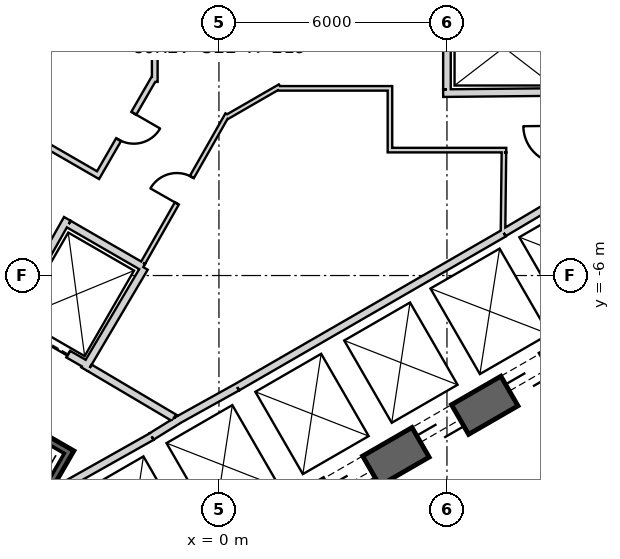
"""IFC4 building model, lengths in metres.
Left out: names, types, materials, properties, quantities, classifications, styles, units other than length and angle.
Written with IfcOpenShell. Run it as: python <this file> out.ifc"""

import sys

from ifc_helpers import new_model, si_unit, direction, frame, frame_2d, origin, place, context, subcontext, project, spatial, rectangle, extrude, element, fill, save


model = new_model("IFC4")
c1 = context("Model", 3, precision=1e-05, world=origin(), true_north=direction((0.0, 1.0)))
c2 = subcontext(c1, "Body", "Model", "MODEL_VIEW")
j1 = project(units=[si_unit("LENGTHUNIT", "METRE"), si_unit("PLANEANGLEUNIT", "RADIAN")], contexts=[c1])
p1 = place(None, origin())
s1 = spatial("IfcSite", under=j1, at=p1, CompositionType="ELEMENT")
p2 = place(p1, origin())
s2 = spatial("IfcBuilding", under=s1, at=p2, CompositionType="ELEMENT")
p3 = place(p2, frame((0.0, 0.0, 156.2)))
s3 = spatial("IfcBuildingStorey", under=s2, at=p3, CompositionType="ELEMENT", Elevation=156.2)
p4 = place(p3, frame((-7.825, -17.97, 0.0), z_axis=(0.0, 0.0, 1.0), x_axis=(0.866028369851, 0.499994862586, 0.0)))
e1 = element("IfcWall", 1, at=p4, inside=s3, PredefinedType="SHEAR", context=c2, shape_type="SweptSolid", body=[
    extrude(rectangle(XDim=31.523, YDim=0.9, at=frame_2d((15.762, 0.0))), origin(), (0.0, 0.0, 1.0), 7.0),
])
p5 = place(p4, frame((7.062, 0.0, 0.0)))
e2 = element("IfcOpeningElement", 2, at=p5, cuts=e1, PredefinedType="OPENING", context=c2, shape_type="SweptSolid", body=[
    extrude(rectangle(XDim=1.2, YDim=2.4, at=frame_2d((0.6, 1.2))), frame((0.0, 0.46, 0.0), z_axis=(0.0, -1.0, 0.0), x_axis=(1.0, 0.0, 0.0)), (0.0, 0.0, 1.0), 0.92),
])
p6 = place(p4, frame((9.762, 0.0, 0.0)))
e3 = element("IfcOpeningElement", 3, at=p6, cuts=e1, PredefinedType="OPENING", context=c2, shape_type="SweptSolid", body=[
    extrude(rectangle(XDim=1.2, YDim=2.4, at=frame_2d((0.6, 1.2))), frame((0.0, 0.46, 0.0), z_axis=(0.0, -1.0, 0.0), x_axis=(1.0, 0.0, 0.0)), (0.0, 0.0, 1.0), 0.92),
])
p7 = place(p4, frame((12.462, 0.0, 0.0)))
e4 = element("IfcOpeningElement", 4, at=p7, cuts=e1, PredefinedType="OPENING", context=c2, shape_type="SweptSolid", body=[
    extrude(rectangle(XDim=1.2, YDim=2.4, at=frame_2d((0.6, 1.2))), frame((0.0, 0.46, 0.0), z_axis=(0.0, -1.0, 0.0), x_axis=(1.0, 0.0, 0.0)), (0.0, 0.0, 1.0), 0.92),
])
p8 = place(p4, frame((15.162, 0.0, 0.0)))
e5 = element("IfcOpeningElement", 5, at=p8, cuts=e1, PredefinedType="OPENING", context=c2, shape_type="SweptSolid", body=[
    extrude(rectangle(XDim=1.2, YDim=2.4, at=frame_2d((0.6, 1.2))), frame((0.0, 0.46, 0.0), z_axis=(0.0, -1.0, 0.0), x_axis=(1.0, 0.0, 0.0)), (0.0, 0.0, 1.0), 0.92),
])
p9 = place(p4, frame((17.862, 0.0, 0.0)))
e6 = element("IfcOpeningElement", 6, at=p9, cuts=e1, PredefinedType="OPENING", context=c2, shape_type="SweptSolid", body=[
    extrude(rectangle(XDim=1.2, YDim=2.4, at=frame_2d((0.6, 1.2))), frame((0.0, 0.46, 0.0), z_axis=(0.0, -1.0, 0.0), x_axis=(1.0, 0.0, 0.0)), (0.0, 0.0, 1.0), 0.92),
])
p10 = place(p4, frame((20.562, 0.0, 0.0)))
e7 = element("IfcOpeningElement", 7, at=p10, cuts=e1, PredefinedType="OPENING", context=c2, shape_type="SweptSolid", body=[
    extrude(rectangle(XDim=1.2, YDim=2.4, at=frame_2d((0.6, 1.2))), frame((0.0, 0.46, 0.0), z_axis=(0.0, -1.0, 0.0), x_axis=(1.0, 0.0, 0.0)), (0.0, 0.0, 1.0), 0.92),
])
p11 = place(p4, frame((26.712, 0.0, 0.0)))
e8 = element("IfcOpeningElement", 8, at=p11, cuts=e1, PredefinedType="OPENING", context=c2, shape_type="SweptSolid", body=[
    extrude(rectangle(XDim=1.2, YDim=2.4, at=frame_2d((0.6, 1.2))), frame((0.0, 0.46, 0.0), z_axis=(0.0, -1.0, 0.0), x_axis=(1.0, 0.0, 0.0)), (0.0, 0.0, 1.0), 0.92),
])
p12 = place(p4, frame((3.612, 0.0, 0.0)))
e9 = element("IfcOpeningElement", 9, at=p12, cuts=e1, PredefinedType="OPENING", context=c2, shape_type="SweptSolid", body=[
    extrude(rectangle(XDim=1.2, YDim=2.4, at=frame_2d((0.6, 1.2))), frame((0.0, 0.46, 0.0), z_axis=(0.0, -1.0, 0.0), x_axis=(1.0, 0.0, 0.0)), (0.0, 0.0, 1.0), 0.92),
])
p13 = place(p3, frame((0.483, -8.936, 0.0), z_axis=(0.0, 0.0, 1.0), x_axis=(0.866030989016, 0.499990325971, 0.0)))
e10 = element("IfcWall", 10, at=p13, inside=s3, PredefinedType="PLUMBINGWALL", context=c2, shape_type="SweptSolid", body=[
    extrude(rectangle(XDim=8.1, YDim=0.2, at=frame_2d((4.05, 0.0))), origin(), (0.0, 0.0, 1.0), 6.65),
])
p14 = place(p3, frame((7.493, -4.878, 0.0), z_axis=(0.0, 0.0, 1.0), x_axis=(0.859981807212, 0.510324691999, 0.0)))
e11 = element("IfcWall", 11, at=p14, inside=s3, PredefinedType="PLUMBINGWALL", context=c2, shape_type="SweptSolid", body=[
    extrude(rectangle(XDim=1.845, YDim=0.2, at=frame_2d((0.922, 0.0))), origin(), (0.0, 0.0, 1.0), 6.65),
])
p15 = place(p3, frame((-1.769, -10.237, 0.0), z_axis=(0.0, 0.0, 1.0), x_axis=(-0.871534483978, -0.490334215854, 0.0)))
e12 = element("IfcWall", 12, at=p15, inside=s3, PredefinedType="PLUMBINGWALL", context=c2, shape_type="SweptSolid", body=[
    extrude(rectangle(XDim=2.7, YDim=0.2, at=frame_2d((1.35, 0.0))), origin(), (0.0, 0.0, 1.0), 6.65),
])
p16 = place(p3, frame((-1.024, -9.771, 0.0), z_axis=(0.0, 0.0, 1.0), x_axis=(-0.850348075135, -0.526220629693, 0.0)))
e13 = element("IfcWall", 13, at=p16, inside=s3, PredefinedType="PLUMBINGWALL", context=c2, shape_type="SweptSolid", body=[
    extrude(rectangle(XDim=0.878, YDim=0.2, at=frame_2d((0.439, 0.0))), origin(), (0.0, 0.0, 1.0), 6.65),
])
p17 = place(p3, frame((-1.13, -9.831, 0.0), z_axis=(0.0, 0.0, 1.0), x_axis=(0.874269620932, 0.485440655401, 0.0)))
e14 = element("IfcWall", 14, at=p17, inside=s3, PredefinedType="PLUMBINGWALL", context=c2, shape_type="SweptSolid", body=[
    extrude(rectangle(XDim=1.845, YDim=0.2, at=frame_2d((0.922, 0.0))), origin(), (0.0, 0.0, 1.0), 6.65),
])
p18 = place(p3, frame((5.9, -1.201, 0.0), z_axis=(0.0, 0.0, 1.0), x_axis=(0.999950064753, 0.009993397809, 0.0)))
e15 = element("IfcWall", 15, at=p18, inside=s3, PredefinedType="PLUMBINGWALL", context=c2, shape_type="SweptSolid", body=[
    extrude(rectangle(XDim=3.2, YDim=0.2, at=frame_2d((1.6, 0.0))), origin(), (0.0, 0.0, 1.0), 6.65),
])
p19 = place(p3, frame((6.0, -1.1, 0.0), z_axis=(0.0, 0.0, 1.0), x_axis=(0.0, 1.0, 0.0)))
e16 = element("IfcWall", 16, at=p19, inside=s3, PredefinedType="PLUMBINGWALL", context=c2, shape_type="SweptSolid", body=[
    extrude(rectangle(XDim=2.28, YDim=0.2, at=frame_2d((1.14, 0.0))), origin(), (0.0, 0.0, 1.0), 6.65),
])
p20 = place(p3, frame((-3.905, -10.563, -0.35), z_axis=(0.0, 0.0, 1.0), x_axis=(-0.500012932018, -0.866017937352, 0.0)))
e17 = element("IfcWall", 17, at=p20, inside=s3, PredefinedType="SHEAR", context=c2, shape_type="SweptSolid", body=[
    extrude(rectangle(XDim=8.1, YDim=0.2, at=frame_2d((4.05, 0.0))), origin(), (0.0, 0.0, 1.0), 7.0),
])
p21 = place(p3, frame((-4.041, -10.599, -0.35), z_axis=(0.0, 0.0, 1.0), x_axis=(-0.866047807691, 0.499961193289, 0.0)))
e18 = element("IfcWall", 18, at=p21, inside=s3, PredefinedType="SHEAR", context=c2, shape_type="SweptSolid", body=[
    extrude(rectangle(XDim=3.6, YDim=0.2, at=frame_2d((1.8, 0.0))), origin(), (0.0, 0.0, 1.0), 7.0),
])
p22 = place(p21, frame((1.25, 0.0, 0.35)))
e19 = element("IfcOpeningElement", 19, at=p22, cuts=e18, PredefinedType="OPENING", context=c2, shape_type="SweptSolid", body=[
    extrude(rectangle(XDim=1.1, YDim=2.1, at=frame_2d((0.55, 1.05))), frame((0.0, 0.11, 0.0), z_axis=(0.0, -1.0, 0.0), x_axis=(1.0, 0.0, 0.0)), (0.0, 0.0, 1.0), 0.22),
])
p23 = place(p3, frame((-3.446, -8.368, 0.0), z_axis=(0.0, 0.0, 1.0), x_axis=(-0.866024647952, 0.500001309137, 0.0)))
e20 = element("IfcWall", 20, at=p23, inside=s3, PredefinedType="PLUMBINGWALL", context=c2, shape_type="SweptSolid", body=[
    extrude(rectangle(XDim=2.4, YDim=0.2, at=frame_2d((1.2, 0.0))), origin(), (0.0, 0.0, 1.0), 6.65),
])
p24 = place(p23, frame((0.6, 0.0, 0.0)))
e21 = element("IfcOpeningElement", 21, at=p24, cuts=e20, PredefinedType="OPENING", context=c2, shape_type="SweptSolid", body=[
    extrude(rectangle(XDim=1.2, YDim=2.4, at=frame_2d((0.6, 1.2))), frame((0.0, 0.11, 0.0), z_axis=(0.0, -1.0, 0.0), x_axis=(1.0, 0.0, 0.0)), (0.0, 0.0, 1.0), 0.22),
])
p25 = place(p3, frame((-1.961, -5.796, 0.0), z_axis=(0.0, 0.0, 1.0), x_axis=(-0.508647062354, -0.860975125052, 0.0)))
e22 = element("IfcWall", 22, at=p25, inside=s3, PredefinedType="PLUMBINGWALL", context=c2, shape_type="SweptSolid", body=[
    extrude(rectangle(XDim=3.1, YDim=0.2, at=frame_2d((1.55, 0.0))), origin(), (0.0, 0.0, 1.0), 6.65),
])
p26 = place(p3, frame((-3.99, -4.509, 0.0), z_axis=(0.0, 0.0, 1.0), x_axis=(-0.491358283181, -0.870957540612, 0.0)))
e23 = element("IfcWall", 23, at=p26, inside=s3, PredefinedType="PLUMBINGWALL", context=c2, shape_type="SweptSolid", body=[
    extrude(rectangle(XDim=3.2, YDim=0.2, at=frame_2d((1.6, 0.0))), origin(), (0.0, 0.0, 1.0), 6.65),
])
p27 = place(p3, frame((-3.953, -4.646, 0.0), z_axis=(0.0, 0.0, 1.0), x_axis=(0.866065302921, -0.4999308863, 0.0)))
e24 = element("IfcWall", 24, at=p27, inside=s3, PredefinedType="PLUMBINGWALL", context=c2, shape_type="SweptSolid", body=[
    extrude(rectangle(XDim=2.264, YDim=0.2, at=frame_2d((1.132, 0.0))), origin(), (0.0, 0.0, 1.0), 6.65),
])
p28 = place(p3, frame((-3.401, -8.43, 0.0), z_axis=(0.0, 0.0, 1.0), x_axis=(0.860615607571, -0.509255118781, 0.0)))
e25 = element("IfcWall", 25, at=p28, inside=s3, PredefinedType="PARTITIONING", context=c2, shape_type="SweptSolid", body=[
    extrude(rectangle(XDim=2.581, YDim=0.2, at=frame_2d((1.29, 0.0))), origin(), (0.0, 0.0, 1.0), 6.65),
])
p29 = place(p3, frame((0.224, -1.761, 0.0), z_axis=(0.0, 0.0, 1.0), x_axis=(-0.494327216836, -0.869275907118, 0.0)))
e26 = element("IfcWall", 26, at=p29, inside=s3, PredefinedType="PARTITIONING", context=c2, shape_type="SweptSolid", body=[
    extrude(rectangle(XDim=4.487, YDim=0.12, at=frame_2d((2.244, 0.0))), origin(), (0.0, 0.0, 1.0), 6.65),
])
p30 = place(p29, frame((1.895, 0.0, 0.0)))
e27 = element("IfcOpeningElement", 27, at=p30, cuts=e26, PredefinedType="OPENING", context=c2, shape_type="SweptSolid", body=[
    extrude(rectangle(XDim=0.8, YDim=2.1, at=frame_2d((0.4, 1.05))), frame((0.0, 0.07, 0.0), z_axis=(0.0, -1.0, 0.0), x_axis=(1.0, 0.0, 0.0)), (0.0, 0.0, 1.0), 0.14),
])
p31 = place(p3, frame((1.605, -1.023, 0.0), z_axis=(0.0, 0.0, 1.0), x_axis=(-0.866001581989, -0.50004125829, 0.0)))
e28 = element("IfcWall", 28, at=p31, inside=s3, PredefinedType="PARTITIONING", context=c2, shape_type="SweptSolid", body=[
    extrude(rectangle(XDim=1.635, YDim=0.12, at=frame_2d((0.817, 0.0))), origin(), (0.0, 0.0, 1.0), 6.65),
])
p32 = place(p3, frame((4.56, -1.075, 0.0), z_axis=(0.0, 0.0, 1.0), x_axis=(-1.0, 0.0, 0.0)))
e29 = element("IfcWall", 29, at=p32, inside=s3, PredefinedType="PARTITIONING", context=c2, shape_type="SweptSolid", body=[
    extrude(rectangle(XDim=3.026, YDim=0.12, at=frame_2d((1.513, 0.0))), origin(), (0.0, 0.0, 1.0), 6.65),
])
p33 = place(p3, frame((4.5, -2.76, 0.0), z_axis=(0.0, 0.0, 1.0), x_axis=(0.0, 1.0, 0.0)))
e30 = element("IfcWall", 30, at=p33, inside=s3, PredefinedType="PARTITIONING", context=c2, shape_type="SweptSolid", body=[
    extrude(rectangle(XDim=1.625, YDim=0.12, at=frame_2d((0.812, 0.0))), origin(), (0.0, 0.0, 1.0), 6.65),
])
p34 = place(p3, frame((7.56, -2.7, 0.0), z_axis=(0.0, 0.0, 1.0), x_axis=(-1.0, 0.0, 0.0)))
e31 = element("IfcWall", 31, at=p34, inside=s3, PredefinedType="PARTITIONING", context=c2, shape_type="SweptSolid", body=[
    extrude(rectangle(XDim=3.0, YDim=0.12, at=frame_2d((1.5, 0.0))), origin(), (0.0, 0.0, 1.0), 6.65),
])
p35 = place(p3, frame((7.475, -4.865, 0.0), z_axis=(0.0, 0.0, 1.0), x_axis=(0.011716133148, 0.999931363757, 0.0)))
e32 = element("IfcWall", 32, at=p35, inside=s3, PredefinedType="PARTITIONING", context=c2, shape_type="SweptSolid", body=[
    extrude(rectangle(XDim=2.105, YDim=0.12, at=frame_2d((1.052, 0.0))), origin(), (0.0, 0.0, 1.0), 6.65),
])
p36 = place(p3, frame((-1.689, -0.905, 0.0), z_axis=(0.0, 0.0, 1.0), x_axis=(0.0, 1.0, 0.0)))
e33 = element("IfcWall", 33, at=p36, inside=s3, PredefinedType="PLUMBINGWALL", context=c2, shape_type="SweptSolid", body=[
    extrude(rectangle(XDim=1.656, YDim=0.15, at=frame_2d((0.828, 0.0))), origin(), (0.0, 0.0, 1.0), 6.65),
])
p37 = place(p3, frame((-3.219, -3.425, 0.0), z_axis=(0.0, 0.0, 1.0), x_axis=(0.499996236806, 0.866027576455, 0.0)))
e34 = element("IfcWall", 34, at=p37, inside=s3, PredefinedType="PLUMBINGWALL", context=c2, shape_type="SweptSolid", body=[
    extrude(rectangle(XDim=3.036, YDim=0.15, at=frame_2d((1.518, 0.0))), origin(), (0.0, 0.0, 1.0), 6.65),
])
p38 = place(p37, frame((1.156, 0.0, 0.0)))
e35 = element("IfcOpeningElement", 35, at=p38, cuts=e34, PredefinedType="OPENING", context=c2, shape_type="SweptSolid", body=[
    extrude(rectangle(XDim=0.8, YDim=2.1, at=frame_2d((0.4, 1.05))), frame((0.0, 0.085, 0.0), z_axis=(0.0, -1.0, 0.0), x_axis=(1.0, 0.0, 0.0)), (0.0, 0.0, 1.0), 0.17),
])
p39 = place(p3, frame((-4.653, -2.51, 0.0), z_axis=(0.0, 0.0, 1.0), x_axis=(0.866053003207, -0.499952193351, 0.0)))
e36 = element("IfcWall", 36, at=p39, inside=s3, PredefinedType="PLUMBINGWALL", context=c2, shape_type="SweptSolid", body=[
    extrude(rectangle(XDim=1.625, YDim=0.15, at=frame_2d((0.812, 0.0))), origin(), (0.0, 0.0, 1.0), 6.65),
])
p40 = place(p24, origin())
e37 = element("IfcDoor", 37, at=p40, inside=s3, OperationType="SLIDING_TO_LEFT", PredefinedType="USERDEFINED", context=c2, shape_type="SweptSolid", body=[
    extrude(rectangle(XDim=1.2, YDim=2.4, at=frame_2d((0.6, 1.2))), frame((0.0, 0.025, 0.0), z_axis=(0.0, -1.0, 0.0), x_axis=(1.0, 0.0, 0.0)), (0.0, 0.0, 1.0), 0.05),
])
fill(e21, e37)
p41 = place(p30, origin())
e38 = element("IfcDoor", 38, at=p41, inside=s3, OperationType="SINGLE_SWING_RIGHT", PredefinedType="USERDEFINED", context=c2, shape_type="SweptSolid", body=[
    extrude(rectangle(XDim=0.8, YDim=2.1, at=frame_2d((0.4, 1.05))), frame((0.0, 0.025, 0.0), z_axis=(0.0, -1.0, 0.0), x_axis=(1.0, 0.0, 0.0)), (0.0, 0.0, 1.0), 0.05),
])
fill(e27, e38)
p42 = place(p38, origin())
e39 = element("IfcDoor", 39, at=p42, inside=s3, OperationType="SINGLE_SWING_RIGHT", PredefinedType="USERDEFINED", context=c2, shape_type="SweptSolid", body=[
    extrude(rectangle(XDim=0.8, YDim=2.1, at=frame_2d((0.4, 1.05))), frame((0.0, 0.025, 0.0), z_axis=(0.0, -1.0, 0.0), x_axis=(1.0, 0.0, 0.0)), (0.0, 0.0, 1.0), 0.05),
])
fill(e35, e39)
p43 = place(p7, origin())
e40 = element("IfcDoor", 40, at=p43, inside=s3, OperationType="SLIDING_TO_LEFT", PredefinedType="USERDEFINED", context=c2, shape_type="SweptSolid", body=[
    extrude(rectangle(XDim=1.2, YDim=2.4, at=frame_2d((0.6, 1.2))), frame((0.0, 0.025, 0.0), z_axis=(0.0, -1.0, 0.0), x_axis=(1.0, 0.0, 0.0)), (0.0, 0.0, 1.0), 0.05),
])
fill(e4, e40)
p44 = place(p8, origin())
e41 = element("IfcDoor", 41, at=p44, inside=s3, OperationType="SLIDING_TO_LEFT", PredefinedType="USERDEFINED", context=c2, shape_type="SweptSolid", body=[
    extrude(rectangle(XDim=1.2, YDim=2.4, at=frame_2d((0.6, 1.2))), frame((0.0, 0.025, 0.0), z_axis=(0.0, -1.0, 0.0), x_axis=(1.0, 0.0, 0.0)), (0.0, 0.0, 1.0), 0.05),
])
fill(e5, e41)
p45 = place(p9, origin())
e42 = element("IfcDoor", 42, at=p45, inside=s3, OperationType="SLIDING_TO_LEFT", PredefinedType="USERDEFINED", context=c2, shape_type="SweptSolid", body=[
    extrude(rectangle(XDim=1.2, YDim=2.4, at=frame_2d((0.6, 1.2))), frame((0.0, 0.025, 0.0), z_axis=(0.0, -1.0, 0.0), x_axis=(1.0, 0.0, 0.0)), (0.0, 0.0, 1.0), 0.05),
])
fill(e6, e42)
save(model, sys.argv[1])
